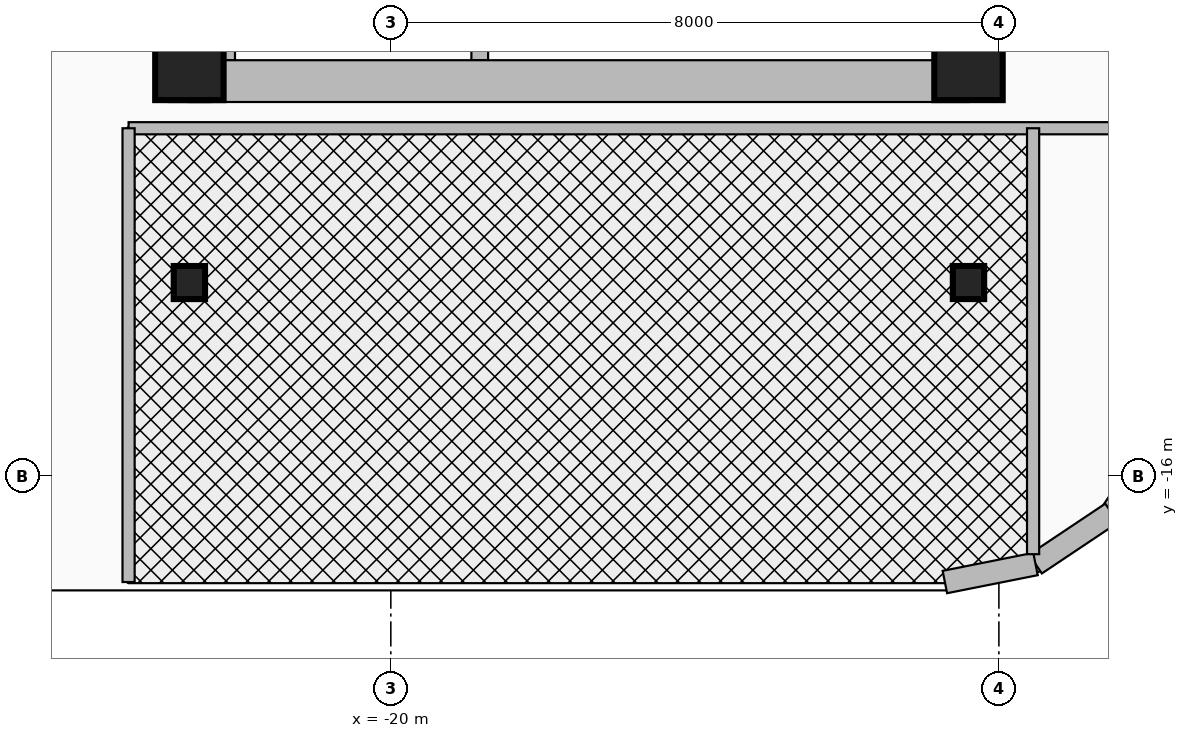
"""IFC4 building model, lengths in metres.
Left out: names, types, materials, properties, quantities, classifications, styles, units other than length and angle.
Written with IfcOpenShell. Run it as: python <this file> out.ifc"""

import sys

from ifc_helpers import new_model, si_unit, direction, frame, frame_2d, origin, origin_2d, place, context, subcontext, project, spatial, rectangle, i_section, extrude, source, transform, mapped, element, fill, save


model = new_model("IFC4")
c1 = context("Model", 3, precision=1e-05, world=origin(), true_north=direction((0.0, 1.0)))
c2 = subcontext(c1, "Body", "Model", "MODEL_VIEW")
j1 = project(units=[si_unit("LENGTHUNIT", "METRE"), si_unit("PLANEANGLEUNIT", "RADIAN")], contexts=[c1])
p1 = place(None, origin())
s1 = spatial("IfcSite", under=j1, at=p1, CompositionType="ELEMENT")
p2 = place(p1, origin())
s2 = spatial("IfcBuilding", under=s1, at=p2, CompositionType="ELEMENT")
p3 = place(p2, frame((0.0, 0.0, 209.0)))
s3 = spatial("IfcBuildingStorey", under=s2, at=p3, CompositionType="ELEMENT", Elevation=209.0)
for number, where, z_axis, x_axis in (
    (1, (-22.16, -10.525, 0.0), (0.0, 0.0, 1.0), (0.0, 1.0, 0.0)),
    (2, (-18.83, -10.525, 0.0), (0.0, 0.0, 1.0), (0.0, 1.0, 0.0)),
):
    element("IfcWall", number, at=place(p3, frame(where, z_axis=z_axis, x_axis=x_axis)), inside=s3, PredefinedType="SHEAR", context=c2, shape_type="SweptSolid", body=[
        extrude(rectangle(XDim=8.745, YDim=0.22, at=frame_2d((4.373, 0.0))), origin(), (0.0, 0.0, 1.0), 3.26),
    ])
p4 = place(p3, frame((-22.65, -11.075, 0.0), z_axis=(0.0, 0.0, 1.0), x_axis=(0.0, 1.0, 0.0)))
e3 = element("IfcWall", 3, at=p4, inside=s3, PredefinedType="SHEAR", context=c2, shape_type="SweptSolid", body=[
    extrude(rectangle(XDim=22.15, YDim=0.55, at=frame_2d((11.075, 0.0))), origin(), (0.0, 0.0, 1.0), 3.26),
])
p5 = place(p3, frame((-22.65, -10.8, 0.0), z_axis=(0.0, 0.0, 1.0), x_axis=(1.0, 0.0, 0.0)))
e4 = element("IfcWall", 4, at=p5, inside=s3, PredefinedType="SHEAR", context=c2, shape_type="SweptSolid", body=[
    extrude(rectangle(XDim=10.25, YDim=0.55, at=frame_2d((5.125, 0.0))), origin(), (0.0, 0.0, 1.0), 3.26),
])
m1 = source(origin(), c2, "Body", "SweptSolid", [
    extrude(rectangle(XDim=0.9, YDim=0.9, at=origin_2d()), origin(), (0.0, 0.0, 1.0), 3.5),
])
for number, where, z_axis, x_axis in (
    (5, (-22.65, -10.6, 0.0), (0.0, 0.0, 1.0), (1.0, 0.0, 0.0)),
    (6, (-12.4, -10.6, 0.0), (0.0, 0.0, 1.0), (1.0, 0.0, 0.0)),
):
    element("IfcColumn", number, at=place(p3, frame(where, z_axis=z_axis, x_axis=x_axis)), inside=s3, PredefinedType="COLUMN", context=c2, shape_type="MappedRepresentation", body=[
        mapped(m1, transform((0.0, 0.0, 0.0), x_axis=(1.0, 0.0, 0.0), y_axis=(0.0, 1.0, 0.0), z_axis=(0.0, 0.0, 1.0), scale=1.0)),
    ])
m2 = source(origin(), c2, "Body", "SweptSolid", [
    extrude(i_section(OverallWidth=0.412, OverallDepth=0.435, WebThickness=0.036, FlangeThickness=0.057, at=origin_2d()), origin(), (0.0, 0.0, 1.0), 3.5),
])
for number, where, z_axis, x_axis in (
    (7, (-22.65, -13.45, 0.0), (0.0, 0.0, 1.0), (1.0, 0.0, 0.0)),
    (8, (-12.4, -13.45, 0.0), (0.0, 0.0, 1.0), (1.0, 0.0, 0.0)),
):
    element("IfcColumn", number, at=place(p3, frame(where, z_axis=z_axis, x_axis=x_axis)), inside=s3, PredefinedType="COLUMN", context=c2, shape_type="MappedRepresentation", body=[
        mapped(m2, transform((0.0, 0.0, 0.0), x_axis=(1.0, 0.0, 0.0), y_axis=(0.0, 1.0, 0.0), z_axis=(0.0, 0.0, 1.0), scale=1.0)),
    ])
for number, where, z_axis, x_axis in (
    (9, (-9.847, -15.482, 0.0), (0.0, 0.0, 1.0), (-0.556, -0.831, 0.0)),
    (10, (-10.517, -16.483, 0.0), (0.0, 0.0, 1.0), (-0.831, -0.556, 0.0)),
):
    element("IfcWall", number, at=place(p3, frame(where, z_axis=z_axis, x_axis=x_axis)), inside=s3, PredefinedType="SOLIDWALL", context=c2, shape_type="SweptSolid", body=[
        extrude(rectangle(XDim=1.205, YDim=0.3, at=frame_2d((0.603, 0.0))), origin(), (0.0, 0.0, 1.0), 3.26),
    ])
p6 = place(p3, frame((-11.518, -17.153, 0.0), z_axis=(0.0, 0.0, 1.0), x_axis=(-0.980804027463, -0.194996050505, 0.0)))
e11 = element("IfcWall", 11, at=p6, inside=s3, PredefinedType="SOLIDWALL", context=c2, shape_type="SweptSolid", body=[
    extrude(rectangle(XDim=1.216, YDim=0.3, at=frame_2d((0.608, 0.0))), origin(), (0.0, 0.0, 1.0), 3.26),
])
p7 = place(p3, frame((-23.45, -11.42, 0.0), z_axis=(0.0, 0.0, 1.0), x_axis=(1.0, 0.0, 0.0)))
e12 = element("IfcWall", 12, at=p7, inside=s3, PredefinedType="PARTITIONING", context=c2, shape_type="SweptSolid", body=[
    extrude(rectangle(XDim=13.84, YDim=0.16, at=frame_2d((6.92, 0.0))), origin(), (0.0, 0.0, 1.0), 2.634),
])
p8 = place(p3, frame((-23.45, -17.39, 0.0), z_axis=(0.0, 0.0, 1.0), x_axis=(0.0, 1.0, 0.0)))
e13 = element("IfcWall", 13, at=p8, inside=s3, PredefinedType="PARTITIONING", context=c2, shape_type="SweptSolid", body=[
    extrude(rectangle(XDim=5.97, YDim=0.16, at=frame_2d((2.985, 0.0))), origin(), (0.0, 0.0, 1.0), 3.26),
])
p9 = place(p3, frame((-11.55, -17.024, 0.0), z_axis=(0.0, 0.0, 1.0), x_axis=(0.0, 1.0, 0.0)))
e14 = element("IfcWall", 14, at=p9, inside=s3, PredefinedType="PARTITIONING", context=c2, shape_type="SweptSolid", body=[
    extrude(rectangle(XDim=5.604, YDim=0.16, at=frame_2d((2.802, 0.0))), origin(), (0.0, 0.0, 1.0), 3.26),
])
p10 = place(p9, frame((2.352, 0.0, 0.0)))
e15 = element("IfcOpeningElement", 15, at=p10, cuts=e14, PredefinedType="OPENING", context=c2, shape_type="SweptSolid", body=[
    extrude(rectangle(XDim=0.9, YDim=2.1, at=frame_2d((0.45, 1.05))), frame((0.0, 0.095, 0.0), z_axis=(0.0, -1.0, 0.0), x_axis=(1.0, 0.0, 0.0)), (0.0, 0.0, 1.0), 0.19),
])
p11 = place(p10, origin())
e16 = element("IfcDoor", 16, at=p11, inside=s3, OperationType="SINGLE_SWING_RIGHT", PredefinedType="DOOR", context=c2, shape_type="SweptSolid", body=[
    extrude(rectangle(XDim=0.9, YDim=2.1, at=frame_2d((0.45, 1.05))), frame((0.0, 0.025, 0.0), z_axis=(0.0, -1.0, 0.0), x_axis=(1.0, 0.0, 0.0)), (0.0, 0.0, 1.0), 0.05),
])
fill(e15, e16)
save(model, sys.argv[1])
